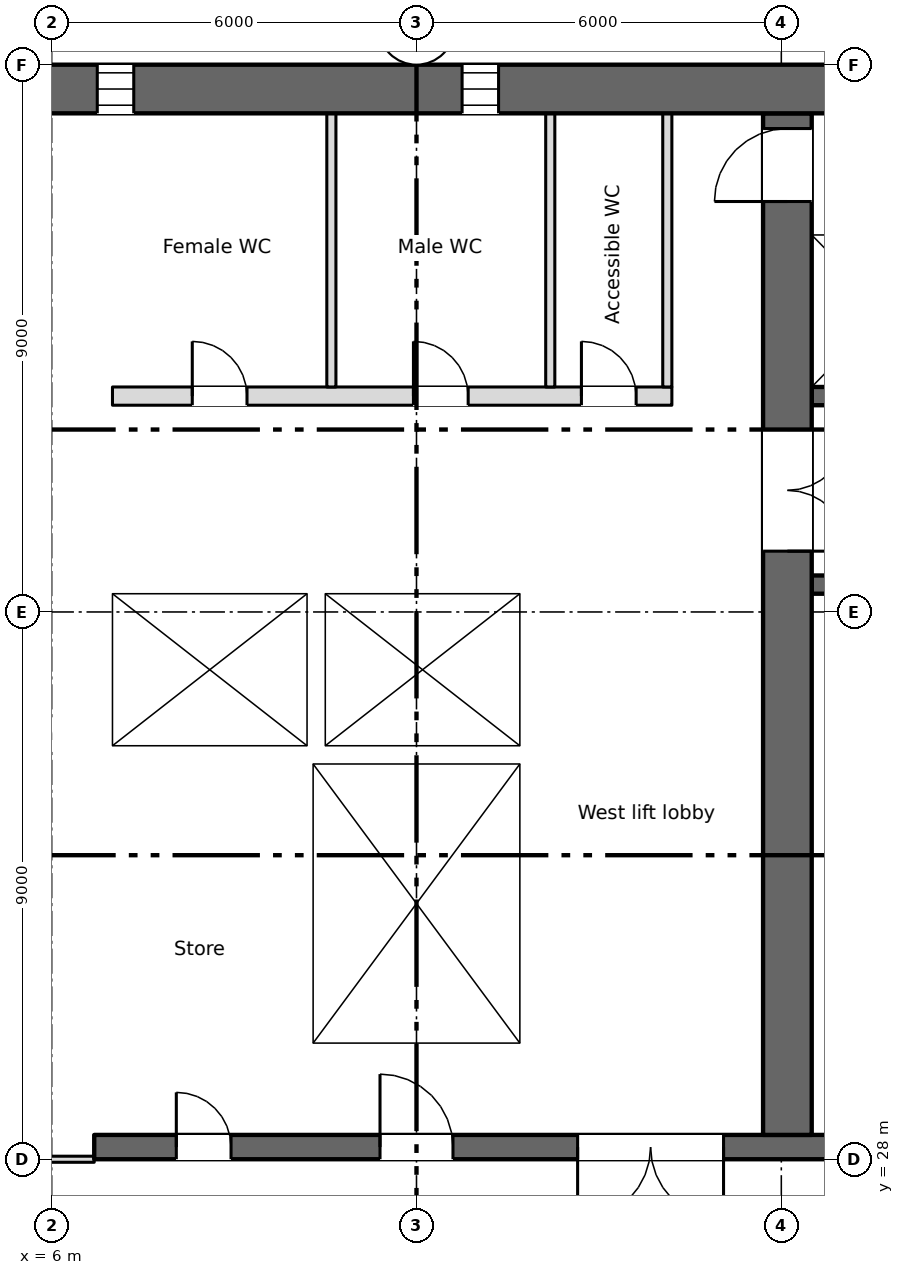
"""IFC4 building model, lengths in metres.
Left out: names, types, materials, properties, quantities, classifications, styles, units other than length and angle.
Written with IfcOpenShell. Run it as: python <this file> out.ifc"""

import sys

from ifc_helpers import new_model, si_unit, direction, frame, frame_2d, origin, place, context, subcontext, project, spatial, rectangle, extrude, element, fill, save


model = new_model("IFC4")
c1 = context("Model", 3, precision=1e-05, world=origin(), true_north=direction((0.0, 1.0)))
c2 = subcontext(c1, "Body", "Model", "MODEL_VIEW")
j1 = project(units=[si_unit("LENGTHUNIT", "METRE"), si_unit("PLANEANGLEUNIT", "RADIAN")], contexts=[c1])
p1 = place(None, origin())
s1 = spatial("IfcSite", under=j1, at=p1, CompositionType="ELEMENT")
p2 = place(p1, origin())
s2 = spatial("IfcBuilding", under=s1, at=p2, CompositionType="ELEMENT")
p3 = place(p2, frame((0.0, 0.0, 147.5)))
s3 = spatial("IfcBuildingStorey", under=s2, at=p3, CompositionType="ELEMENT", Elevation=147.5)
p4 = place(p3, frame((5.55, 45.6, 0.0), z_axis=(0.0, 0.0, 1.0), x_axis=(1.0, 0.0, 0.0)))
e1 = element("IfcWall", 1, at=p4, inside=s3, PredefinedType="SHEAR", context=c2, shape_type="SweptSolid", body=[
    extrude(rectangle(XDim=60.9, YDim=0.8, at=frame_2d((30.45, 0.0))), origin(), (0.0, 0.0, 1.0), 3.35),
])
p5 = place(p4, frame((1.2, 0.0, 0.6)))
e2 = element("IfcOpeningElement", 2, at=p5, cuts=e1, PredefinedType="OPENING", context=c2, shape_type="SweptSolid", body=[
    extrude(rectangle(XDim=0.6, YDim=2.4, at=frame_2d((0.3, 1.2))), frame((0.0, 0.41, 0.0), z_axis=(0.0, -1.0, 0.0), x_axis=(1.0, 0.0, 0.0)), (0.0, 0.0, 1.0), 0.82),
])
p6 = place(p4, frame((7.2, 0.0, 0.6)))
e3 = element("IfcOpeningElement", 3, at=p6, cuts=e1, PredefinedType="OPENING", context=c2, shape_type="SweptSolid", body=[
    extrude(rectangle(XDim=0.6, YDim=2.4, at=frame_2d((0.3, 1.2))), frame((0.0, 0.41, 0.0), z_axis=(0.0, -1.0, 0.0), x_axis=(1.0, 0.0, 0.0)), (0.0, 0.0, 1.0), 0.82),
])
p7 = place(p3, frame((6.7, 28.2, 0.0), z_axis=(0.0, 0.0, 1.0), x_axis=(1.0, 0.0, 0.0)))
e4 = element("IfcWall", 4, at=p7, inside=s3, PredefinedType="SHEAR", context=c2, shape_type="SweptSolid", body=[
    extrude(rectangle(XDim=57.8, YDim=0.4, at=frame_2d((28.9, 0.0))), origin(), (0.0, 0.0, 1.0), 3.35),
])
p8 = place(p7, frame((13.85, 0.0, 0.0)))
e5 = element("IfcOpeningElement", 5, at=p8, cuts=e4, PredefinedType="OPENING", context=c2, shape_type="SweptSolid", body=[
    extrude(rectangle(XDim=0.9, YDim=2.1, at=frame_2d((0.45, 1.05))), frame((0.0, 0.21, 0.0), z_axis=(0.0, -1.0, 0.0), x_axis=(1.0, 0.0, 0.0)), (0.0, 0.0, 1.0), 0.42),
])
p9 = place(p7, frame((48.562, 0.0, 0.0)))
e6 = element("IfcOpeningElement", 6, at=p9, cuts=e4, PredefinedType="OPENING", context=c2, shape_type="SweptSolid", body=[
    extrude(rectangle(XDim=0.9, YDim=2.1, at=frame_2d((0.45, 1.05))), frame((0.0, 0.21, 0.0), z_axis=(0.0, -1.0, 0.0), x_axis=(1.0, 0.0, 0.0)), (0.0, 0.0, 1.0), 0.42),
])
p10 = place(p7, frame((51.137, 0.0, 0.0)))
e7 = element("IfcOpeningElement", 7, at=p10, cuts=e4, PredefinedType="OPENING", context=c2, shape_type="SweptSolid", body=[
    extrude(rectangle(XDim=0.9, YDim=2.1, at=frame_2d((0.45, 1.05))), frame((0.0, 0.21, 0.0), z_axis=(0.0, -1.0, 0.0), x_axis=(1.0, 0.0, 0.0)), (0.0, 0.0, 1.0), 0.42),
])
p11 = place(p7, frame((1.35, 0.0, 0.0)))
e8 = element("IfcOpeningElement", 8, at=p11, cuts=e4, PredefinedType="OPENING", context=c2, shape_type="SweptSolid", body=[
    extrude(rectangle(XDim=0.9, YDim=2.1, at=frame_2d((0.45, 1.05))), frame((0.0, 0.21, 0.0), z_axis=(0.0, -1.0, 0.0), x_axis=(1.0, 0.0, 0.0)), (0.0, 0.0, 1.0), 0.42),
])
p12 = place(p7, frame((4.7, 0.0, 0.0)))
e9 = element("IfcOpeningElement", 9, at=p12, cuts=e4, PredefinedType="OPENING", context=c2, shape_type="SweptSolid", body=[
    extrude(rectangle(XDim=1.2, YDim=2.1, at=frame_2d((0.6, 1.05))), frame((0.0, 0.21, 0.0), z_axis=(0.0, -1.0, 0.0), x_axis=(1.0, 0.0, 0.0)), (0.0, 0.0, 1.0), 0.42),
])
p13 = place(p7, frame((31.7, 0.0, 0.0)))
e10 = element("IfcOpeningElement", 10, at=p13, cuts=e4, PredefinedType="OPENING", context=c2, shape_type="SweptSolid", body=[
    extrude(rectangle(XDim=1.2, YDim=2.1, at=frame_2d((0.6, 1.05))), frame((0.0, 0.21, 0.0), z_axis=(0.0, -1.0, 0.0), x_axis=(1.0, 0.0, 0.0)), (0.0, 0.0, 1.0), 0.42),
])
p14 = place(p7, frame((55.2, 0.0, 0.0)))
e11 = element("IfcOpeningElement", 11, at=p14, cuts=e4, PredefinedType="OPENING", context=c2, shape_type="SweptSolid", body=[
    extrude(rectangle(XDim=1.2, YDim=2.1, at=frame_2d((0.6, 1.05))), frame((0.0, 0.21, 0.0), z_axis=(0.0, -1.0, 0.0), x_axis=(1.0, 0.0, 0.0)), (0.0, 0.0, 1.0), 0.42),
])
p15 = place(p7, frame((21.7, 0.0, 0.0)))
e12 = element("IfcOpeningElement", 12, at=p15, cuts=e4, PredefinedType="OPENING", context=c2, shape_type="SweptSolid", body=[
    extrude(rectangle(XDim=1.2, YDim=2.1, at=frame_2d((0.6, 1.05))), frame((0.0, 0.21, 0.0), z_axis=(0.0, -1.0, 0.0), x_axis=(1.0, 0.0, 0.0)), (0.0, 0.0, 1.0), 0.42),
])
p16 = place(p7, frame((41.7, 0.0, 0.0)))
e13 = element("IfcOpeningElement", 13, at=p16, cuts=e4, PredefinedType="OPENING", context=c2, shape_type="SweptSolid", body=[
    extrude(rectangle(XDim=1.2, YDim=2.1, at=frame_2d((0.6, 1.05))), frame((0.0, 0.21, 0.0), z_axis=(0.0, -1.0, 0.0), x_axis=(1.0, 0.0, 0.0)), (0.0, 0.0, 1.0), 0.42),
])
p17 = place(p7, frame((24.85, 0.0, 0.0)))
e14 = element("IfcOpeningElement", 14, at=p17, cuts=e4, PredefinedType="OPENING", context=c2, shape_type="SweptSolid", body=[
    extrude(rectangle(XDim=2.4, YDim=2.1, at=frame_2d((1.2, 1.05))), frame((0.0, 0.21, 0.0), z_axis=(0.0, -1.0, 0.0), x_axis=(1.0, 0.0, 0.0)), (0.0, 0.0, 1.0), 0.42),
])
p18 = place(p7, frame((37.35, 0.0, 0.0)))
e15 = element("IfcOpeningElement", 15, at=p18, cuts=e4, PredefinedType="OPENING", context=c2, shape_type="SweptSolid", body=[
    extrude(rectangle(XDim=2.4, YDim=2.1, at=frame_2d((1.2, 1.05))), frame((0.0, 0.21, 0.0), z_axis=(0.0, -1.0, 0.0), x_axis=(1.0, 0.0, 0.0)), (0.0, 0.0, 1.0), 0.42),
])
p19 = place(p7, frame((7.95, 0.0, 0.0)))
e16 = element("IfcOpeningElement", 16, at=p19, cuts=e4, PredefinedType="OPENING", context=c2, shape_type="SweptSolid", body=[
    extrude(rectangle(XDim=2.4, YDim=2.1, at=frame_2d((1.2, 1.05))), frame((0.0, 0.21, 0.0), z_axis=(0.0, -1.0, 0.0), x_axis=(1.0, 0.0, 0.0)), (0.0, 0.0, 1.0), 0.42),
])
p20 = place(p7, frame((28.85, 0.0, 0.0)))
e17 = element("IfcOpeningElement", 17, at=p20, cuts=e4, PredefinedType="OPENING", context=c2, shape_type="SweptSolid", body=[
    extrude(rectangle(XDim=0.9, YDim=2.1, at=frame_2d((0.45, 1.05))), frame((0.0, 0.21, 0.0), z_axis=(0.0, -1.0, 0.0), x_axis=(1.0, 0.0, 0.0)), (0.0, 0.0, 1.0), 0.42),
])
p21 = place(p7, frame((34.85, 0.0, 0.0)))
e18 = element("IfcOpeningElement", 18, at=p21, cuts=e4, PredefinedType="OPENING", context=c2, shape_type="SweptSolid", body=[
    extrude(rectangle(XDim=0.9, YDim=2.1, at=frame_2d((0.45, 1.05))), frame((0.0, 0.21, 0.0), z_axis=(0.0, -1.0, 0.0), x_axis=(1.0, 0.0, 0.0)), (0.0, 0.0, 1.0), 0.42),
])
p22 = place(p3, frame((6.85, 28.4, 0.0), z_axis=(0.0, 0.0, 1.0), x_axis=(0.0, 1.0, 0.0)))
e19 = element("IfcWall", 19, at=p22, inside=s3, PredefinedType="SHEAR", context=c2, shape_type="SweptSolid", body=[
    extrude(rectangle(XDim=16.8, YDim=0.3, at=frame_2d((8.4, 0.0))), origin(), (0.0, 0.0, 1.0), 3.35),
])
p23 = place(p3, frame((18.1, 28.4, 0.0), z_axis=(0.0, 0.0, 1.0), x_axis=(0.0, 1.0, 0.0)))
e20 = element("IfcWall", 20, at=p23, inside=s3, PredefinedType="SHEAR", context=c2, shape_type="SweptSolid", body=[
    extrude(rectangle(XDim=16.8, YDim=0.8, at=frame_2d((8.4, 0.0))), origin(), (0.0, 0.0, 1.0), 3.35),
])
p24 = place(p23, frame((9.6, 0.0, 0.0)))
e21 = element("IfcOpeningElement", 21, at=p24, cuts=e20, PredefinedType="OPENING", context=c2, shape_type="SweptSolid", body=[
    extrude(rectangle(XDim=2.0, YDim=2.1, at=frame_2d((1.0, 1.05))), frame((0.0, 0.41, 0.0), z_axis=(0.0, -1.0, 0.0), x_axis=(1.0, 0.0, 0.0)), (0.0, 0.0, 1.0), 0.82),
])
p25 = place(p23, frame((15.35, 0.0, 0.0)))
e22 = element("IfcOpeningElement", 22, at=p25, cuts=e20, PredefinedType="OPENING", context=c2, shape_type="SweptSolid", body=[
    extrude(rectangle(XDim=1.2, YDim=2.1, at=frame_2d((0.6, 1.05))), frame((0.0, 0.41, 0.0), z_axis=(0.0, -1.0, 0.0), x_axis=(1.0, 0.0, 0.0)), (0.0, 0.0, 1.0), 0.82),
])
for number, where, z_axis, x_axis in (
    (23, (10.15, 28.4, 0.0), (0.0, 0.0, 1.0), (0.0, 1.0, 0.0)),
    (24, (13.85, 28.4, 0.0), (0.0, 0.0, 1.0), (0.0, 1.0, 0.0)),
):
    element("IfcWall", number, at=place(p3, frame(where, z_axis=z_axis, x_axis=x_axis)), inside=s3, PredefinedType="SHEAR", context=c2, shape_type="SweptSolid", body=[
        extrude(rectangle(XDim=6.1, YDim=0.3, at=frame_2d((3.05, 0.0))), origin(), (0.0, 0.0, 1.0), 3.35),
    ])
p26 = place(p3, frame((7.0, 34.65, 0.0), z_axis=(0.0, 0.0, 1.0), x_axis=(1.0, 0.0, 0.0)))
e25 = element("IfcWall", 25, at=p26, inside=s3, PredefinedType="SHEAR", context=c2, shape_type="SweptSolid", body=[
    extrude(rectangle(XDim=7.0, YDim=0.3, at=frame_2d((3.5, 0.0))), origin(), (0.0, 0.0, 1.0), 3.35),
])
p27 = place(p3, frame((18.5, 34.65, 0.0), z_axis=(0.0, 0.0, 1.0), x_axis=(1.0, 0.0, 0.0)))
e26 = element("IfcWall", 26, at=p27, inside=s3, PredefinedType="SHEAR", context=c2, shape_type="SweptSolid", body=[
    extrude(rectangle(XDim=12.2, YDim=0.3, at=frame_2d((6.1, 0.0))), origin(), (0.0, 0.0, 1.0), 3.35),
])
p28 = place(p27, frame((9.8, 0.0, 0.0)))
e27 = element("IfcOpeningElement", 27, at=p28, cuts=e26, PredefinedType="OPENING", context=c2, shape_type="SweptSolid", body=[
    extrude(rectangle(XDim=1.1, YDim=2.1, at=frame_2d((0.55, 1.05))), frame((0.0, 0.16, 0.0), z_axis=(0.0, -1.0, 0.0), x_axis=(1.0, 0.0, 0.0)), (0.0, 0.0, 1.0), 0.32),
])
p29 = place(p3, frame((7.0, 37.45, 0.0), z_axis=(0.0, 0.0, 1.0), x_axis=(1.0, 0.0, 0.0)))
e28 = element("IfcWall", 28, at=p29, inside=s3, PredefinedType="SHEAR", context=c2, shape_type="SweptSolid", body=[
    extrude(rectangle(XDim=7.0, YDim=0.3, at=frame_2d((3.5, 0.0))), origin(), (0.0, 0.0, 1.0), 3.35),
])
p30 = place(p3, frame((30.7, 37.45, 0.0), z_axis=(0.0, 0.0, 1.0), x_axis=(-1.0, 0.0, 0.0)))
e29 = element("IfcWall", 29, at=p30, inside=s3, PredefinedType="SHEAR", context=c2, shape_type="SweptSolid", body=[
    extrude(rectangle(XDim=12.2, YDim=0.3, at=frame_2d((6.1, 0.0))), origin(), (0.0, 0.0, 1.0), 3.35),
])
p31 = place(p30, frame((7.4, 0.0, 0.0)))
e30 = element("IfcOpeningElement", 30, at=p31, cuts=e29, PredefinedType="OPENING", context=c2, shape_type="SweptSolid", body=[
    extrude(rectangle(XDim=0.9, YDim=2.1, at=frame_2d((0.45, 1.05))), frame((0.0, 0.16, 0.0), z_axis=(0.0, -1.0, 0.0), x_axis=(1.0, 0.0, 0.0)), (0.0, 0.0, 1.0), 0.32),
])
p32 = place(p3, frame((13.85, 34.8, 0.0), z_axis=(0.0, 0.0, 1.0), x_axis=(0.0, 1.0, 0.0)))
e31 = element("IfcWall", 31, at=p32, inside=s3, PredefinedType="SHEAR", context=c2, shape_type="SweptSolid", body=[
    extrude(rectangle(XDim=2.5, YDim=0.3, at=frame_2d((1.25, 0.0))), origin(), (0.0, 0.0, 1.0), 3.35),
])
p33 = place(p3, frame((18.5, 40.55, 0.0), z_axis=(0.0, 0.0, 1.0), x_axis=(1.0, 0.0, 0.0)))
e32 = element("IfcWall", 32, at=p33, inside=s3, PredefinedType="SHEAR", context=c2, shape_type="SweptSolid", body=[
    extrude(rectangle(XDim=41.0, YDim=0.3, at=frame_2d((20.5, 0.0))), origin(), (0.0, 0.0, 1.0), 3.35),
])
p34 = place(p33, frame((18.65, 0.0, 0.0)))
e33 = element("IfcOpeningElement", 33, at=p34, cuts=e32, PredefinedType="OPENING", context=c2, shape_type="SweptSolid", body=[
    extrude(rectangle(XDim=0.9, YDim=2.1, at=frame_2d((0.45, 1.05))), frame((0.0, 0.16, 0.0), z_axis=(0.0, -1.0, 0.0), x_axis=(1.0, 0.0, 0.0)), (0.0, 0.0, 1.0), 0.32),
])
p35 = place(p33, frame((6.175, 0.0, 0.0)))
e34 = element("IfcOpeningElement", 34, at=p35, cuts=e32, PredefinedType="OPENING", context=c2, shape_type="SweptSolid", body=[
    extrude(rectangle(XDim=1.1, YDim=2.1, at=frame_2d((0.55, 1.05))), frame((0.0, 0.16, 0.0), z_axis=(0.0, -1.0, 0.0), x_axis=(1.0, 0.0, 0.0)), (0.0, 0.0, 1.0), 0.32),
])
p36 = place(p33, frame((8.925, 0.0, 0.0)))
e35 = element("IfcOpeningElement", 35, at=p36, cuts=e32, PredefinedType="OPENING", context=c2, shape_type="SweptSolid", body=[
    extrude(rectangle(XDim=1.1, YDim=2.1, at=frame_2d((0.55, 1.05))), frame((0.0, 0.16, 0.0), z_axis=(0.0, -1.0, 0.0), x_axis=(1.0, 0.0, 0.0)), (0.0, 0.0, 1.0), 0.32),
])
p37 = place(p33, frame((11.675, 0.0, 0.0)))
e36 = element("IfcOpeningElement", 36, at=p37, cuts=e32, PredefinedType="OPENING", context=c2, shape_type="SweptSolid", body=[
    extrude(rectangle(XDim=1.1, YDim=2.1, at=frame_2d((0.55, 1.05))), frame((0.0, 0.16, 0.0), z_axis=(0.0, -1.0, 0.0), x_axis=(1.0, 0.0, 0.0)), (0.0, 0.0, 1.0), 0.32),
])
p38 = place(p33, frame((30.925, 0.0, 0.0)))
e37 = element("IfcOpeningElement", 37, at=p38, cuts=e32, PredefinedType="OPENING", context=c2, shape_type="SweptSolid", body=[
    extrude(rectangle(XDim=1.1, YDim=2.1, at=frame_2d((0.55, 1.05))), frame((0.0, 0.16, 0.0), z_axis=(0.0, -1.0, 0.0), x_axis=(1.0, 0.0, 0.0)), (0.0, 0.0, 1.0), 0.32),
])
p39 = place(p33, frame((33.675, 0.0, 0.0)))
e38 = element("IfcOpeningElement", 38, at=p39, cuts=e32, PredefinedType="OPENING", context=c2, shape_type="SweptSolid", body=[
    extrude(rectangle(XDim=1.1, YDim=2.1, at=frame_2d((0.55, 1.05))), frame((0.0, 0.16, 0.0), z_axis=(0.0, -1.0, 0.0), x_axis=(1.0, 0.0, 0.0)), (0.0, 0.0, 1.0), 0.32),
])
p40 = place(p33, frame((36.375, 0.0, 0.0)))
e39 = element("IfcOpeningElement", 39, at=p40, cuts=e32, PredefinedType="OPENING", context=c2, shape_type="SweptSolid", body=[
    extrude(rectangle(XDim=1.2, YDim=2.1, at=frame_2d((0.6, 1.05))), frame((0.0, 0.16, 0.0), z_axis=(0.0, -1.0, 0.0), x_axis=(1.0, 0.0, 0.0)), (0.0, 0.0, 1.0), 0.32),
])
p41 = place(p33, frame((39.15, 0.0, 0.0)))
e40 = element("IfcOpeningElement", 40, at=p41, cuts=e32, PredefinedType="OPENING", context=c2, shape_type="SweptSolid", body=[
    extrude(rectangle(XDim=1.2, YDim=2.1, at=frame_2d((0.6, 1.05))), frame((0.0, 0.16, 0.0), z_axis=(0.0, -1.0, 0.0), x_axis=(1.0, 0.0, 0.0)), (0.0, 0.0, 1.0), 0.32),
])
p42 = place(p3, frame((18.5, 43.35, 0.0), z_axis=(0.0, 0.0, 1.0), x_axis=(1.0, 0.0, 0.0)))
e41 = element("IfcWall", 41, at=p42, inside=s3, PredefinedType="SHEAR", context=c2, shape_type="SweptSolid", body=[
    extrude(rectangle(XDim=41.0, YDim=0.3, at=frame_2d((20.5, 0.0))), origin(), (0.0, 0.0, 1.0), 3.35),
])
p43 = place(p3, frame((7.0, 40.55, 0.0), z_axis=(0.0, 0.0, 1.0), x_axis=(1.0, 0.0, 0.0)))
e42 = element("IfcWall", 42, at=p43, inside=s3, PredefinedType="PARTITIONING", context=c2, shape_type="SweptSolid", body=[
    extrude(rectangle(XDim=9.2, YDim=0.3, at=frame_2d((4.6, 0.0))), origin(), (0.0, 0.0, 1.0), 3.35),
])
p44 = place(p43, frame((1.312, 0.0, 0.0)))
e43 = element("IfcOpeningElement", 43, at=p44, cuts=e42, PredefinedType="OPENING", context=c2, shape_type="SweptSolid", body=[
    extrude(rectangle(XDim=0.9, YDim=2.1, at=frame_2d((0.45, 1.05))), frame((0.0, 0.16, 0.0), z_axis=(0.0, -1.0, 0.0), x_axis=(1.0, 0.0, 0.0)), (0.0, 0.0, 1.0), 0.32),
])
p45 = place(p43, frame((4.95, 0.0, 0.0)))
e44 = element("IfcOpeningElement", 44, at=p45, cuts=e42, PredefinedType="OPENING", context=c2, shape_type="SweptSolid", body=[
    extrude(rectangle(XDim=0.9, YDim=2.1, at=frame_2d((0.45, 1.05))), frame((0.0, 0.16, 0.0), z_axis=(0.0, -1.0, 0.0), x_axis=(1.0, 0.0, 0.0)), (0.0, 0.0, 1.0), 0.32),
])
p46 = place(p43, frame((7.712, 0.0, 0.0)))
e45 = element("IfcOpeningElement", 45, at=p46, cuts=e42, PredefinedType="OPENING", context=c2, shape_type="SweptSolid", body=[
    extrude(rectangle(XDim=0.9, YDim=2.1, at=frame_2d((0.45, 1.05))), frame((0.0, 0.16, 0.0), z_axis=(0.0, -1.0, 0.0), x_axis=(1.0, 0.0, 0.0)), (0.0, 0.0, 1.0), 0.32),
])
p47 = place(p3, frame((10.35, 34.8, 0.0), z_axis=(0.0, 0.0, 1.0), x_axis=(0.0, 1.0, 0.0)))
e46 = element("IfcWall", 46, at=p47, inside=s3, PredefinedType="SHEAR", context=c2, shape_type="SweptSolid", body=[
    extrude(rectangle(XDim=2.5, YDim=0.3, at=frame_2d((1.25, 0.0))), origin(), (0.0, 0.0, 1.0), 3.35),
])
for number, where, z_axis, x_axis in (
    (47, (16.125, 40.7, 0.0), (0.0, 0.0, 1.0), (0.0, 1.0, 0.0)),
    (48, (10.6, 40.7, 0.0), (0.0, 0.0, 1.0), (0.0, 1.0, 0.0)),
    (49, (14.2, 40.7, 0.0), (0.0, 0.0, 1.0), (0.0, 1.0, 0.0)),
):
    element("IfcWall", number, at=place(p3, frame(where, z_axis=z_axis, x_axis=x_axis)), inside=s3, PredefinedType="PARTITIONING", context=c2, shape_type="SweptSolid", body=[
        extrude(rectangle(XDim=4.5, YDim=0.15, at=frame_2d((2.25, 0.0))), origin(), (0.0, 0.0, 1.0), 3.35),
    ])
p48 = place(p3, frame((0.7, 28.0, 0.0), z_axis=(0.0, 0.0, 1.0), x_axis=(1.0, 0.0, 0.0)))
e50 = element("IfcWall", 50, at=p48, inside=s3, PredefinedType="PARTITIONING", context=c2, shape_type="SweptSolid", body=[
    extrude(rectangle(XDim=6.0, YDim=0.1, at=frame_2d((3.0, 0.0))), origin(), (0.0, 0.0, 1.0), 3.35),
])
p49 = place(p48, frame((2.1, 0.0, 0.0)))
e51 = element("IfcOpeningElement", 51, at=p49, cuts=e50, PredefinedType="OPENING", context=c2, shape_type="SweptSolid", body=[
    extrude(rectangle(XDim=1.8, YDim=2.1, at=frame_2d((0.9, 1.05))), frame((0.0, 0.06, 0.0), z_axis=(0.0, -1.0, 0.0), x_axis=(1.0, 0.0, 0.0)), (0.0, 0.0, 1.0), 0.12),
])
p50 = place(p5, origin())
e52 = element("IfcWindow", 52, at=p50, inside=s3, PartitioningType="SINGLE_PANEL", PredefinedType="WINDOW", context=c2, shape_type="SweptSolid", body=[
    extrude(rectangle(XDim=0.6, YDim=2.4, at=frame_2d((0.3, 1.2))), frame((0.0, 0.03, 0.0), z_axis=(0.0, -1.0, 0.0), x_axis=(1.0, 0.0, 0.0)), (0.0, 0.0, 1.0), 0.06),
])
fill(e2, e52)
p51 = place(p6, origin())
e53 = element("IfcWindow", 53, at=p51, inside=s3, PartitioningType="SINGLE_PANEL", PredefinedType="WINDOW", context=c2, shape_type="SweptSolid", body=[
    extrude(rectangle(XDim=0.6, YDim=2.4, at=frame_2d((0.3, 1.2))), frame((0.0, 0.03, 0.0), z_axis=(0.0, -1.0, 0.0), x_axis=(1.0, 0.0, 0.0)), (0.0, 0.0, 1.0), 0.06),
])
fill(e3, e53)
p52 = place(p11, origin())
e54 = element("IfcDoor", 54, at=p52, inside=s3, OperationType="SINGLE_SWING_LEFT", PredefinedType="DOOR", context=c2, shape_type="SweptSolid", body=[
    extrude(rectangle(XDim=0.9, YDim=2.1, at=frame_2d((0.45, 1.05))), frame((0.0, 0.025, 0.0), z_axis=(0.0, -1.0, 0.0), x_axis=(1.0, 0.0, 0.0)), (0.0, 0.0, 1.0), 0.05),
])
fill(e8, e54)
p53 = place(p44, origin())
e55 = element("IfcDoor", 55, at=p53, inside=s3, OperationType="SINGLE_SWING_LEFT", PredefinedType="DOOR", context=c2, shape_type="SweptSolid", body=[
    extrude(rectangle(XDim=0.9, YDim=2.1, at=frame_2d((0.45, 1.05))), frame((0.0, 0.025, 0.0), z_axis=(0.0, -1.0, 0.0), x_axis=(1.0, 0.0, 0.0)), (0.0, 0.0, 1.0), 0.05),
])
fill(e43, e55)
p54 = place(p45, origin())
e56 = element("IfcDoor", 56, at=p54, inside=s3, OperationType="SINGLE_SWING_LEFT", PredefinedType="DOOR", context=c2, shape_type="SweptSolid", body=[
    extrude(rectangle(XDim=0.9, YDim=2.1, at=frame_2d((0.45, 1.05))), frame((0.0, 0.025, 0.0), z_axis=(0.0, -1.0, 0.0), x_axis=(1.0, 0.0, 0.0)), (0.0, 0.0, 1.0), 0.05),
])
fill(e44, e56)
p55 = place(p46, origin())
e57 = element("IfcDoor", 57, at=p55, inside=s3, OperationType="SINGLE_SWING_LEFT", PredefinedType="DOOR", context=c2, shape_type="SweptSolid", body=[
    extrude(rectangle(XDim=0.9, YDim=2.1, at=frame_2d((0.45, 1.05))), frame((0.0, 0.025, 0.0), z_axis=(0.0, -1.0, 0.0), x_axis=(1.0, 0.0, 0.0)), (0.0, 0.0, 1.0), 0.05),
])
fill(e45, e57)
p56 = place(p12, origin())
e58 = element("IfcDoor", 58, at=p56, inside=s3, OperationType="SINGLE_SWING_LEFT", PredefinedType="DOOR", context=c2, shape_type="SweptSolid", body=[
    extrude(rectangle(XDim=1.2, YDim=2.1, at=frame_2d((0.6, 1.05))), frame((0.0, 0.025, 0.0), z_axis=(0.0, -1.0, 0.0), x_axis=(1.0, 0.0, 0.0)), (0.0, 0.0, 1.0), 0.05),
])
fill(e9, e58)
p57 = place(p19, origin())
e59 = element("IfcDoor", 59, at=p57, inside=s3, OperationType="DOUBLE_DOOR_SINGLE_SWING", PredefinedType="DOOR", context=c2, shape_type="SweptSolid", body=[
    extrude(rectangle(XDim=2.4, YDim=2.1, at=frame_2d((1.2, 1.05))), frame((0.0, 0.025, 0.0), z_axis=(0.0, -1.0, 0.0), x_axis=(1.0, 0.0, 0.0)), (0.0, 0.0, 1.0), 0.05),
])
fill(e16, e59)
p58 = place(p24, origin())
e60 = element("IfcDoor", 60, at=p58, inside=s3, OperationType="DOUBLE_DOOR_SINGLE_SWING", PredefinedType="DOOR", context=c2, shape_type="SweptSolid", body=[
    extrude(rectangle(XDim=2.0, YDim=2.1, at=frame_2d((1.0, 1.05))), frame((0.0, 0.025, 0.0), z_axis=(0.0, -1.0, 0.0), x_axis=(1.0, 0.0, 0.0)), (0.0, 0.0, 1.0), 0.05),
])
fill(e21, e60)
p59 = place(p25, origin())
e61 = element("IfcDoor", 61, at=p59, inside=s3, OperationType="SINGLE_SWING_LEFT", PredefinedType="DOOR", context=c2, shape_type="SweptSolid", body=[
    extrude(rectangle(XDim=1.2, YDim=2.1, at=frame_2d((0.6, 1.05))), frame((0.0, 0.025, 0.0), z_axis=(0.0, -1.0, 0.0), x_axis=(1.0, 0.0, 0.0)), (0.0, 0.0, 1.0), 0.05),
])
fill(e22, e61)
save(model, sys.argv[1])
